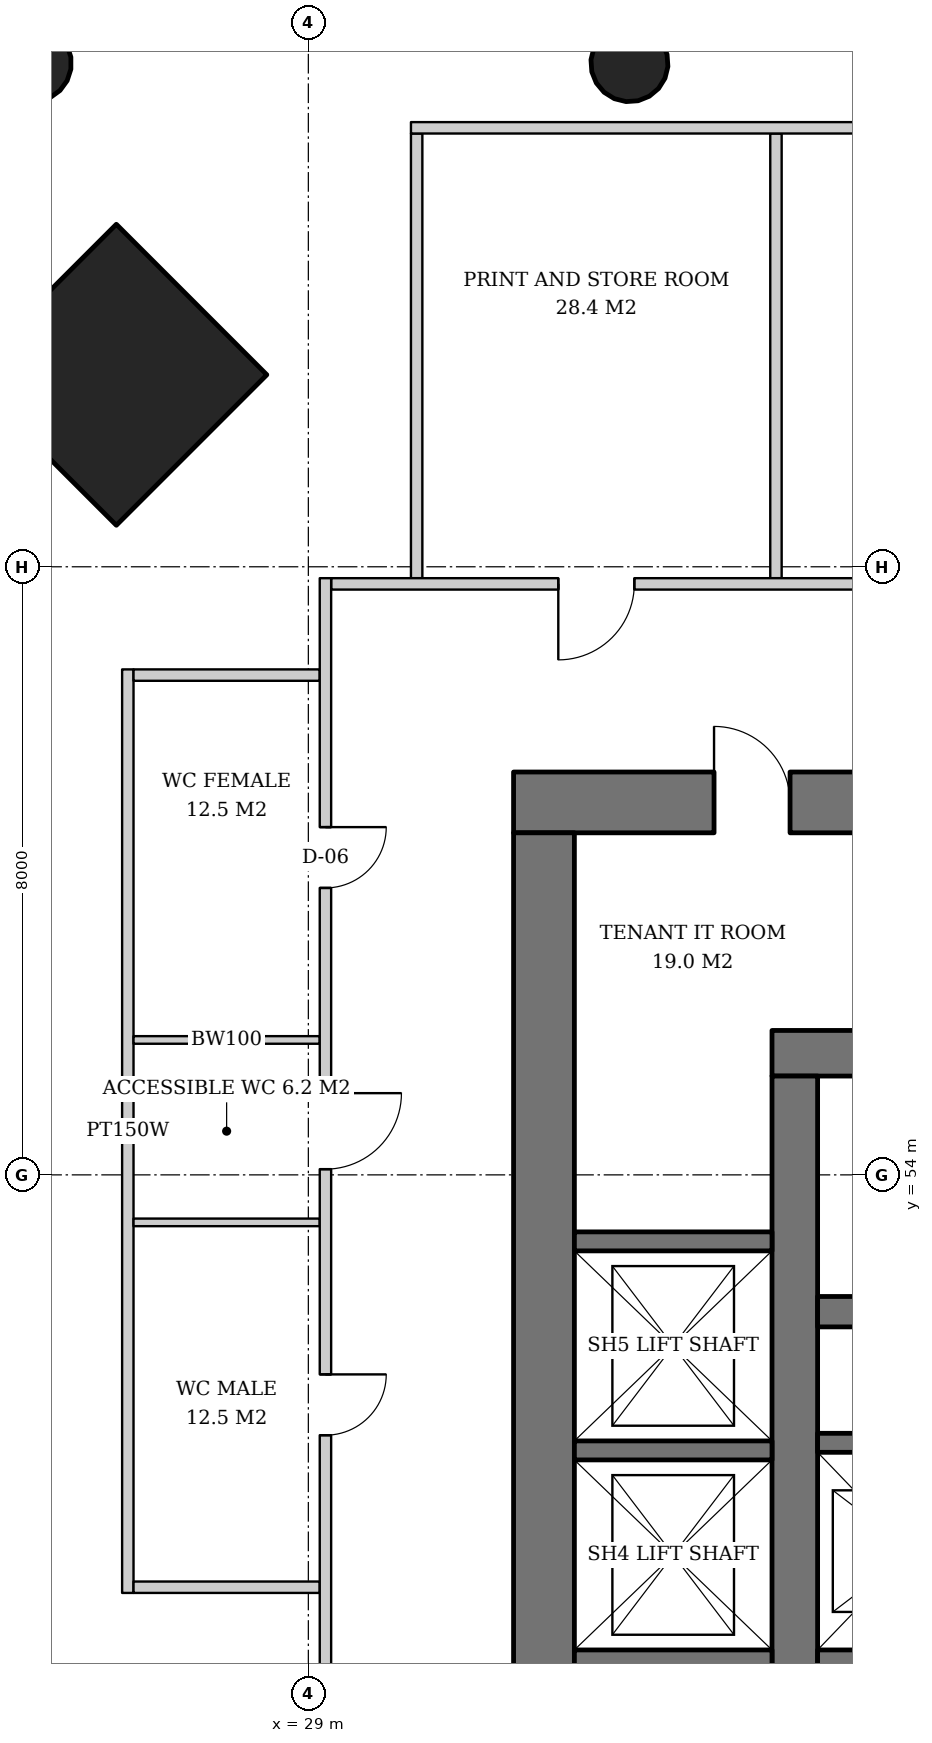
"""IFC4 building model, lengths in metres.
Left out: names, types, materials, properties, quantities, classifications, styles, units other than length and angle.
Written with IfcOpenShell. Run it as: python <this file> out.ifc"""

import sys

from ifc_helpers import new_model, si_unit, direction, frame, frame_2d, origin, origin_2d, place, context, subcontext, project, spatial, rectangle, hollow_circle, extrude, element, fill, save


model = new_model("IFC4")
c1 = context("Model", 3, precision=1e-05, world=origin(), true_north=direction((0.0, 1.0)))
c2 = subcontext(c1, "Body", "Model", "MODEL_VIEW")
j1 = project(units=[si_unit("LENGTHUNIT", "METRE"), si_unit("PLANEANGLEUNIT", "RADIAN")], contexts=[c1])
p1 = place(None, origin())
s1 = spatial("IfcSite", under=j1, at=p1, CompositionType="ELEMENT")
p2 = place(p1, origin())
s2 = spatial("IfcBuilding", under=s1, at=p2, CompositionType="ELEMENT")
p3 = place(p2, frame((0.0, 0.0, 62.8)))
s3 = spatial("IfcBuildingStorey", under=s2, at=p3, CompositionType="ELEMENT", Elevation=62.8)
p4 = place(p3, frame((26.436, 64.564, 0.0), z_axis=(0.031898107953, -0.031898107953, 0.998981992539), x_axis=(0.707106781187, 0.707106781187, 0.0)))
e1 = element("IfcColumn", 1, at=p4, inside=s3, PredefinedType="COLUMN", context=c2, shape_type="SweptSolid", body=[
    extrude(rectangle(XDim=2.8, YDim=2.8, at=origin_2d()), origin(), (0.0, 0.0, 1.0), 3.804),
])
p5 = place(p3, frame((25.336, 68.664, 0.0), z_axis=(0.031898107953, -0.031898107953, 0.998981992539), x_axis=(0.707106781187, 0.707106781187, 0.0)))
e2 = element("IfcColumn", 2, at=p5, inside=s3, PredefinedType="COLUMN", context=c2, shape_type="SweptSolid", body=[
    extrude(hollow_circle(Radius=0.508, WallThickness=0.04, at=origin_2d()), origin(), (0.0, 0.0, 1.0), 3.804),
])
p6 = place(p3, frame((33.201, 68.664, 0.0), z_axis=(0.019132263625, -0.031908506785, 0.999307662176), x_axis=(0.857645150882, 0.514241961696, 0.0)))
e3 = element("IfcColumn", 3, at=p6, inside=s3, PredefinedType="COLUMN", context=c2, shape_type="SweptSolid", body=[
    extrude(hollow_circle(Radius=0.508, WallThickness=0.04, at=origin_2d()), origin(), (0.0, 0.0, 1.0), 3.803),
])
p7 = place(p3, frame((35.1, 55.6, 0.0), z_axis=(0.0, 0.0, 1.0), x_axis=(1.0, 0.0, 0.0)))
e4 = element("IfcWall", 4, at=p7, inside=s3, PredefinedType="SHEAR", context=c2, shape_type="SweptSolid", body=[
    extrude(rectangle(XDim=19.8, YDim=0.6, at=frame_2d((9.9, 0.0))), origin(), (0.0, 0.0, 1.0), 3.8),
])
p8 = place(p7, frame((14.54, 0.0, 0.0)))
e5 = element("IfcOpeningElement", 5, at=p8, cuts=e4, PredefinedType="OPENING", context=c2, shape_type="SweptSolid", body=[
    extrude(rectangle(XDim=1.0, YDim=2.1, at=frame_2d((0.5, 1.05))), frame((0.0, 0.31, 0.0), z_axis=(0.0, -1.0, 0.0), x_axis=(1.0, 0.0, 0.0)), (0.0, 0.0, 1.0), 0.62),
])
p9 = place(p7, frame((2.425, 0.0, 0.0)))
e6 = element("IfcOpeningElement", 6, at=p9, cuts=e4, PredefinedType="OPENING", context=c2, shape_type="SweptSolid", body=[
    extrude(rectangle(XDim=1.0, YDim=2.1, at=frame_2d((0.5, 1.05))), frame((0.0, 0.31, 0.0), z_axis=(0.0, -1.0, 0.0), x_axis=(1.0, 0.0, 0.0)), (0.0, 0.0, 1.0), 0.62),
])
p10 = place(p3, frame((35.4, 36.7, 0.0), z_axis=(0.0, 0.0, 1.0), x_axis=(0.0, 1.0, 0.0)))
e7 = element("IfcWall", 7, at=p10, inside=s3, PredefinedType="SHEAR", context=c2, shape_type="SweptSolid", body=[
    extrude(rectangle(XDim=18.6, YDim=0.6, at=frame_2d((9.3, 0.0))), origin(), (0.0, 0.0, 1.0), 3.8),
])
p11 = place(p10, frame((8.4, 0.0, 0.0)))
e8 = element("IfcOpeningElement", 8, at=p11, cuts=e7, PredefinedType="OPENING", context=c2, shape_type="SweptSolid", body=[
    extrude(rectangle(XDim=1.8, YDim=2.4, at=frame_2d((0.9, 1.2))), frame((0.0, 0.31, 0.0), z_axis=(0.0, -1.0, 0.0), x_axis=(1.0, 0.0, 0.0)), (0.0, 0.0, 1.0), 0.62),
])
p12 = place(p3, frame((31.7, 58.9, 0.0), z_axis=(0.0, 0.0, 1.0), x_axis=(1.0, 0.0, 0.0)))
e9 = element("IfcWall", 9, at=p12, inside=s3, PredefinedType="SHEAR", context=c2, shape_type="SweptSolid", body=[
    extrude(rectangle(XDim=26.6, YDim=0.8, at=frame_2d((13.3, 0.0))), origin(), (0.0, 0.0, 1.0), 3.8),
])
p13 = place(p12, frame((17.94, 0.0, 0.0)))
e10 = element("IfcOpeningElement", 10, at=p13, cuts=e9, PredefinedType="OPENING", context=c2, shape_type="SweptSolid", body=[
    extrude(rectangle(XDim=1.0, YDim=2.1, at=frame_2d((0.5, 1.05))), frame((0.0, 0.41, 0.0), z_axis=(0.0, -1.0, 0.0), x_axis=(1.0, 0.0, 0.0)), (0.0, 0.0, 1.0), 0.82),
])
p14 = place(p12, frame((5.825, 0.0, 0.0)))
e11 = element("IfcOpeningElement", 11, at=p14, cuts=e9, PredefinedType="OPENING", context=c2, shape_type="SweptSolid", body=[
    extrude(rectangle(XDim=1.0, YDim=2.1, at=frame_2d((0.5, 1.05))), frame((0.0, 0.41, 0.0), z_axis=(0.0, -1.0, 0.0), x_axis=(1.0, 0.0, 0.0)), (0.0, 0.0, 1.0), 0.82),
])
p15 = place(p12, frame((2.637, 0.0, 0.0)))
e12 = element("IfcOpeningElement", 12, at=p15, cuts=e9, PredefinedType="OPENING", context=c2, shape_type="SweptSolid", body=[
    extrude(rectangle(XDim=1.0, YDim=2.1, at=frame_2d((0.5, 1.05))), frame((0.0, 0.41, 0.0), z_axis=(0.0, -1.0, 0.0), x_axis=(1.0, 0.0, 0.0)), (0.0, 0.0, 1.0), 0.82),
])
p16 = place(p12, frame((8.44, 0.0, 0.0)))
e13 = element("IfcOpeningElement", 13, at=p16, cuts=e9, PredefinedType="OPENING", context=c2, shape_type="SweptSolid", body=[
    extrude(rectangle(XDim=1.0, YDim=2.1, at=frame_2d((0.5, 1.05))), frame((0.0, 0.41, 0.0), z_axis=(0.0, -1.0, 0.0), x_axis=(1.0, 0.0, 0.0)), (0.0, 0.0, 1.0), 0.82),
])
p17 = place(p12, frame((13.342, 0.0, 0.0)))
e14 = element("IfcOpeningElement", 14, at=p17, cuts=e9, PredefinedType="OPENING", context=c2, shape_type="SweptSolid", body=[
    extrude(rectangle(XDim=1.0, YDim=2.1, at=frame_2d((0.5, 1.05))), frame((0.0, 0.41, 0.0), z_axis=(0.0, -1.0, 0.0), x_axis=(1.0, 0.0, 0.0)), (0.0, 0.0, 1.0), 0.82),
])
p18 = place(p12, frame((22.35, 0.0, 0.0)))
e15 = element("IfcOpeningElement", 15, at=p18, cuts=e9, PredefinedType="OPENING", context=c2, shape_type="SweptSolid", body=[
    extrude(rectangle(XDim=1.0, YDim=2.1, at=frame_2d((0.5, 1.05))), frame((0.0, 0.41, 0.0), z_axis=(0.0, -1.0, 0.0), x_axis=(1.0, 0.0, 0.0)), (0.0, 0.0, 1.0), 0.82),
])
p19 = place(p3, frame((32.1, 33.5, 0.0), z_axis=(0.0, 0.0, 1.0), x_axis=(0.0, 1.0, 0.0)))
e16 = element("IfcWall", 16, at=p19, inside=s3, PredefinedType="SHEAR", context=c2, shape_type="SweptSolid", body=[
    extrude(rectangle(XDim=25.0, YDim=0.8, at=frame_2d((12.5, 0.0))), origin(), (0.0, 0.0, 1.0), 3.8),
])
p20 = place(p19, frame((11.6, 0.0, 0.0)))
e17 = element("IfcOpeningElement", 17, at=p20, cuts=e16, PredefinedType="OPENING", context=c2, shape_type="SweptSolid", body=[
    extrude(rectangle(XDim=1.8, YDim=2.4, at=frame_2d((0.9, 1.2))), frame((0.0, 0.41, 0.0), z_axis=(0.0, -1.0, 0.0), x_axis=(1.0, 0.0, 0.0)), (0.0, 0.0, 1.0), 0.82),
])
p21 = place(p3, frame((35.7, 52.2, 0.0), z_axis=(0.0, 0.0, 1.0), x_axis=(1.0, 0.0, 0.0)))
e18 = element("IfcWall", 18, at=p21, inside=s3, PredefinedType="SHEAR", context=c2, shape_type="SweptSolid", body=[
    extrude(rectangle(XDim=18.6, YDim=0.4, at=frame_2d((9.3, 0.0))), origin(), (0.0, 0.0, 1.0), 3.8),
])
p22 = place(p3, frame((35.7, 50.475, 0.0), z_axis=(0.0, 0.0, 1.0), x_axis=(1.0, 0.0, 0.0)))
e19 = element("IfcWall", 19, at=p22, inside=s3, PredefinedType="SHEAR", context=c2, shape_type="SweptSolid", body=[
    extrude(rectangle(XDim=11.0, YDim=0.25, at=frame_2d((5.5, 0.0))), origin(), (0.0, 0.0, 1.0), 3.8),
])
p23 = place(p3, frame((35.7, 47.625, 0.0), z_axis=(0.0, 0.0, 1.0), x_axis=(1.0, 0.0, 0.0)))
e20 = element("IfcWall", 20, at=p23, inside=s3, PredefinedType="SHEAR", context=c2, shape_type="SweptSolid", body=[
    extrude(rectangle(XDim=12.83, YDim=0.25, at=frame_2d((6.415, 0.0))), origin(), (0.0, 0.0, 1.0), 3.8),
])
p24 = place(p23, frame((0.7, 0.0, 0.0)))
e21 = element("IfcOpeningElement", 21, at=p24, cuts=e20, PredefinedType="OPENING", context=c2, shape_type="SweptSolid", body=[
    extrude(rectangle(XDim=1.1, YDim=2.2, at=frame_2d((0.55, 1.1))), frame((0.0, 0.135, 0.0), z_axis=(0.0, -1.0, 0.0), x_axis=(1.0, 0.0, 0.0)), (0.0, 0.0, 1.0), 0.27),
])
p25 = place(p23, frame((3.45, 0.0, 0.0)))
e22 = element("IfcOpeningElement", 22, at=p25, cuts=e20, PredefinedType="OPENING", context=c2, shape_type="SweptSolid", body=[
    extrude(rectangle(XDim=1.1, YDim=2.2, at=frame_2d((0.55, 1.1))), frame((0.0, 0.135, 0.0), z_axis=(0.0, -1.0, 0.0), x_axis=(1.0, 0.0, 0.0)), (0.0, 0.0, 1.0), 0.27),
])
p26 = place(p23, frame((6.2, 0.0, 0.0)))
e23 = element("IfcOpeningElement", 23, at=p26, cuts=e20, PredefinedType="OPENING", context=c2, shape_type="SweptSolid", body=[
    extrude(rectangle(XDim=1.1, YDim=2.2, at=frame_2d((0.55, 1.1))), frame((0.0, 0.135, 0.0), z_axis=(0.0, -1.0, 0.0), x_axis=(1.0, 0.0, 0.0)), (0.0, 0.0, 1.0), 0.27),
])
p27 = place(p23, frame((8.95, 0.0, 0.0)))
e24 = element("IfcOpeningElement", 24, at=p27, cuts=e20, PredefinedType="OPENING", context=c2, shape_type="SweptSolid", body=[
    extrude(rectangle(XDim=1.1, YDim=2.2, at=frame_2d((0.55, 1.1))), frame((0.0, 0.135, 0.0), z_axis=(0.0, -1.0, 0.0), x_axis=(1.0, 0.0, 0.0)), (0.0, 0.0, 1.0), 0.27),
])
p28 = place(p23, frame((11.515, 0.0, 0.0)))
e25 = element("IfcOpeningElement", 25, at=p28, cuts=e20, PredefinedType="OPENING", context=c2, shape_type="SweptSolid", body=[
    extrude(rectangle(XDim=0.8, YDim=2.0, at=frame_2d((0.4, 1.0))), frame((0.0, 0.135, 0.0), z_axis=(0.0, -1.0, 0.0), x_axis=(1.0, 0.0, 0.0)), (0.0, 0.0, 1.0), 0.27),
])
for number, where, z_axis, x_axis in (
    (26, (32.5, 47.625, 0.0), (0.0, 0.0, 1.0), (1.0, 0.0, 0.0)),
    (27, (32.5, 50.375, 0.0), (0.0, 0.0, 1.0), (1.0, 0.0, 0.0)),
    (28, (32.5, 53.125, 0.0), (0.0, 0.0, 1.0), (1.0, 0.0, 0.0)),
):
    element("IfcWall", number, at=place(p3, frame(where, z_axis=z_axis, x_axis=x_axis)), inside=s3, PredefinedType="SHEAR", context=c2, shape_type="SweptSolid", body=[
        extrude(rectangle(XDim=2.6, YDim=0.25, at=frame_2d((1.3, 0.0))), origin(), (0.0, 0.0, 1.0), 3.8),
    ])
for number, where, z_axis, x_axis in (
    (29, (35.152, 61.85, 0.0), (0.0, 0.0, 1.0), (0.0, 1.0, 0.0)),
    (30, (30.425, 61.85, 0.0), (0.0, 0.0, 1.0), (0.0, 1.0, 0.0)),
):
    element("IfcWall", number, at=place(p3, frame(where, z_axis=z_axis, x_axis=x_axis)), inside=s3, PredefinedType="PARTITIONING", context=c2, shape_type="SweptSolid", body=[
        extrude(rectangle(XDim=5.85, YDim=0.15, at=frame_2d((2.925, 0.0))), origin(), (0.0, 0.0, 1.0), 3.62),
    ])
p29 = place(p3, frame((59.65, 67.775, 0.0), z_axis=(0.0, 0.0, 1.0), x_axis=(-1.0, 0.0, 0.0)))
e31 = element("IfcWall", 31, at=p29, inside=s3, PredefinedType="PARTITIONING", context=c2, shape_type="SweptSolid", body=[
    extrude(rectangle(XDim=29.3, YDim=0.15, at=frame_2d((14.65, 0.0))), origin(), (0.0, 0.0, 1.0), 2.612),
])
p30 = place(p3, frame((26.625, 60.65, 0.0), z_axis=(0.0, 0.0, 1.0), x_axis=(0.0, -1.0, 0.0)))
e32 = element("IfcWall", 32, at=p30, inside=s3, PredefinedType="PARTITIONING", context=c2, shape_type="SweptSolid", body=[
    extrude(rectangle(XDim=12.15, YDim=0.15, at=frame_2d((6.075, 0.0))), origin(), (0.0, 0.0, 1.0), 2.612),
])
p31 = place(p3, frame((29.15, 60.575, 0.0), z_axis=(0.0, 0.0, 1.0), x_axis=(-1.0, 0.0, 0.0)))
e33 = element("IfcWall", 33, at=p31, inside=s3, PredefinedType="PARTITIONING", context=c2, shape_type="SweptSolid", body=[
    extrude(rectangle(XDim=2.45, YDim=0.15, at=frame_2d((1.225, 0.0))), origin(), (0.0, 0.0, 1.0), 3.62),
])
for number, where, z_axis, x_axis in (
    (34, (29.15, 55.775, 0.0), (0.0, 0.0, 1.0), (-1.0, 0.0, 0.0)),
    (35, (29.15, 53.375, 0.0), (0.0, 0.0, 1.0), (-1.0, 0.0, 0.0)),
):
    element("IfcWall", number, at=place(p3, frame(where, z_axis=z_axis, x_axis=x_axis)), inside=s3, PredefinedType="SOLIDWALL", context=c2, shape_type="SweptSolid", body=[
        extrude(rectangle(XDim=2.45, YDim=0.1, at=frame_2d((1.225, 0.0))), origin(), (0.0, 0.0, 1.0), 3.62),
    ])
p32 = place(p3, frame((29.15, 48.575, 0.0), z_axis=(0.0, 0.0, 1.0), x_axis=(-1.0, 0.0, 0.0)))
e36 = element("IfcWall", 36, at=p32, inside=s3, PredefinedType="PARTITIONING", context=c2, shape_type="SweptSolid", body=[
    extrude(rectangle(XDim=2.45, YDim=0.15, at=frame_2d((1.225, 0.0))), origin(), (0.0, 0.0, 1.0), 3.62),
])
p33 = place(p3, frame((60.85, 61.775, 0.0), z_axis=(0.0, 0.0, 1.0), x_axis=(-1.0, 0.0, 0.0)))
e37 = element("IfcWall", 37, at=p33, inside=s3, PredefinedType="PARTITIONING", context=c2, shape_type="SweptSolid", body=[
    extrude(rectangle(XDim=31.55, YDim=0.15, at=frame_2d((15.775, 0.0))), origin(), (0.0, 0.0, 1.0), 2.612),
])
p34 = place(p33, frame((9.041, 0.0, 0.0)))
e38 = element("IfcOpeningElement", 38, at=p34, cuts=e37, PredefinedType="OPENING", context=c2, shape_type="SweptSolid", body=[
    extrude(rectangle(XDim=1.8, YDim=2.4, at=frame_2d((0.9, 1.2))), frame((0.0, 0.085, 0.0), z_axis=(0.0, -1.0, 0.0), x_axis=(1.0, 0.0, 0.0)), (0.0, 0.0, 1.0), 0.17),
])
p35 = place(p33, frame((21.653, 0.0, 0.0)))
e39 = element("IfcOpeningElement", 39, at=p35, cuts=e37, PredefinedType="OPENING", context=c2, shape_type="SweptSolid", body=[
    extrude(rectangle(XDim=1.0, YDim=2.1, at=frame_2d((0.5, 1.05))), frame((0.0, 0.085, 0.0), z_axis=(0.0, -1.0, 0.0), x_axis=(1.0, 0.0, 0.0)), (0.0, 0.0, 1.0), 0.17),
])
p36 = place(p33, frame((27.562, 0.0, 0.0)))
e40 = element("IfcOpeningElement", 40, at=p36, cuts=e37, PredefinedType="OPENING", context=c2, shape_type="SweptSolid", body=[
    extrude(rectangle(XDim=1.0, YDim=2.1, at=frame_2d((0.5, 1.05))), frame((0.0, 0.085, 0.0), z_axis=(0.0, -1.0, 0.0), x_axis=(1.0, 0.0, 0.0)), (0.0, 0.0, 1.0), 0.17),
])
p37 = place(p3, frame((29.225, 61.85, 0.0), z_axis=(0.0, 0.0, 1.0), x_axis=(0.0, -1.0, 0.0)))
e41 = element("IfcWall", 41, at=p37, inside=s3, PredefinedType="PARTITIONING", context=c2, shape_type="SweptSolid", body=[
    extrude(rectangle(XDim=31.55, YDim=0.15, at=frame_2d((15.775, 0.0))), origin(), (0.0, 0.0, 1.0), 2.612),
])
p38 = place(p37, frame((3.275, 0.0, 0.0)))
e42 = element("IfcOpeningElement", 42, at=p38, cuts=e41, PredefinedType="OPENING", context=c2, shape_type="SweptSolid", body=[
    extrude(rectangle(XDim=0.8, YDim=2.1, at=frame_2d((0.4, 1.05))), frame((0.0, 0.085, 0.0), z_axis=(0.0, -1.0, 0.0), x_axis=(1.0, 0.0, 0.0)), (0.0, 0.0, 1.0), 0.17),
])
p39 = place(p37, frame((6.775, 0.0, 0.0)))
e43 = element("IfcOpeningElement", 43, at=p39, cuts=e41, PredefinedType="OPENING", context=c2, shape_type="SweptSolid", body=[
    extrude(rectangle(XDim=1.0, YDim=2.1, at=frame_2d((0.5, 1.05))), frame((0.0, 0.085, 0.0), z_axis=(0.0, -1.0, 0.0), x_axis=(1.0, 0.0, 0.0)), (0.0, 0.0, 1.0), 0.17),
])
p40 = place(p37, frame((10.475, 0.0, 0.0)))
e44 = element("IfcOpeningElement", 44, at=p40, cuts=e41, PredefinedType="OPENING", context=c2, shape_type="SweptSolid", body=[
    extrude(rectangle(XDim=0.8, YDim=2.1, at=frame_2d((0.4, 1.05))), frame((0.0, 0.085, 0.0), z_axis=(0.0, -1.0, 0.0), x_axis=(1.0, 0.0, 0.0)), (0.0, 0.0, 1.0), 0.17),
])
p41 = place(p15, origin())
e45 = element("IfcDoor", 45, at=p41, inside=s3, OperationType="SINGLE_SWING_LEFT", PredefinedType="DOOR", context=c2, shape_type="SweptSolid", body=[
    extrude(rectangle(XDim=1.0, YDim=2.1, at=frame_2d((0.5, 1.05))), frame((0.0, -0.34, 0.0), z_axis=(0.0, -1.0, 0.0), x_axis=(1.0, 0.0, 0.0)), (0.0, 0.0, 1.0), 0.05),
])
fill(e12, e45)
p42 = place(p36, origin())
e46 = element("IfcDoor", 46, at=p42, inside=s3, OperationType="SINGLE_SWING_RIGHT", PredefinedType="DOOR", context=c2, shape_type="SweptSolid", body=[
    extrude(rectangle(XDim=1.0, YDim=2.1, at=frame_2d((0.5, 1.05))), frame((0.0, 0.025, 0.0), z_axis=(0.0, -1.0, 0.0), x_axis=(1.0, 0.0, 0.0)), (0.0, 0.0, 1.0), 0.05),
])
fill(e40, e46)
p43 = place(p38, origin())
e47 = element("IfcDoor", 47, at=p43, inside=s3, OperationType="SINGLE_SWING_LEFT", PredefinedType="DOOR", context=c2, shape_type="SweptSolid", body=[
    extrude(rectangle(XDim=0.8, YDim=2.1, at=frame_2d((0.4, 1.05))), frame((0.0, 0.025, 0.0), z_axis=(0.0, -1.0, 0.0), x_axis=(1.0, 0.0, 0.0)), (0.0, 0.0, 1.0), 0.05),
])
fill(e42, e47)
p44 = place(p39, origin())
e48 = element("IfcDoor", 48, at=p44, inside=s3, OperationType="SINGLE_SWING_LEFT", PredefinedType="DOOR", context=c2, shape_type="SweptSolid", body=[
    extrude(rectangle(XDim=1.0, YDim=2.1, at=frame_2d((0.5, 1.05))), frame((0.0, 0.025, 0.0), z_axis=(0.0, -1.0, 0.0), x_axis=(1.0, 0.0, 0.0)), (0.0, 0.0, 1.0), 0.05),
])
fill(e43, e48)
p45 = place(p40, origin())
e49 = element("IfcDoor", 49, at=p45, inside=s3, OperationType="SINGLE_SWING_LEFT", PredefinedType="DOOR", context=c2, shape_type="SweptSolid", body=[
    extrude(rectangle(XDim=0.8, YDim=2.1, at=frame_2d((0.4, 1.05))), frame((0.0, 0.025, 0.0), z_axis=(0.0, -1.0, 0.0), x_axis=(1.0, 0.0, 0.0)), (0.0, 0.0, 1.0), 0.05),
])
fill(e44, e49)
save(model, sys.argv[1])
